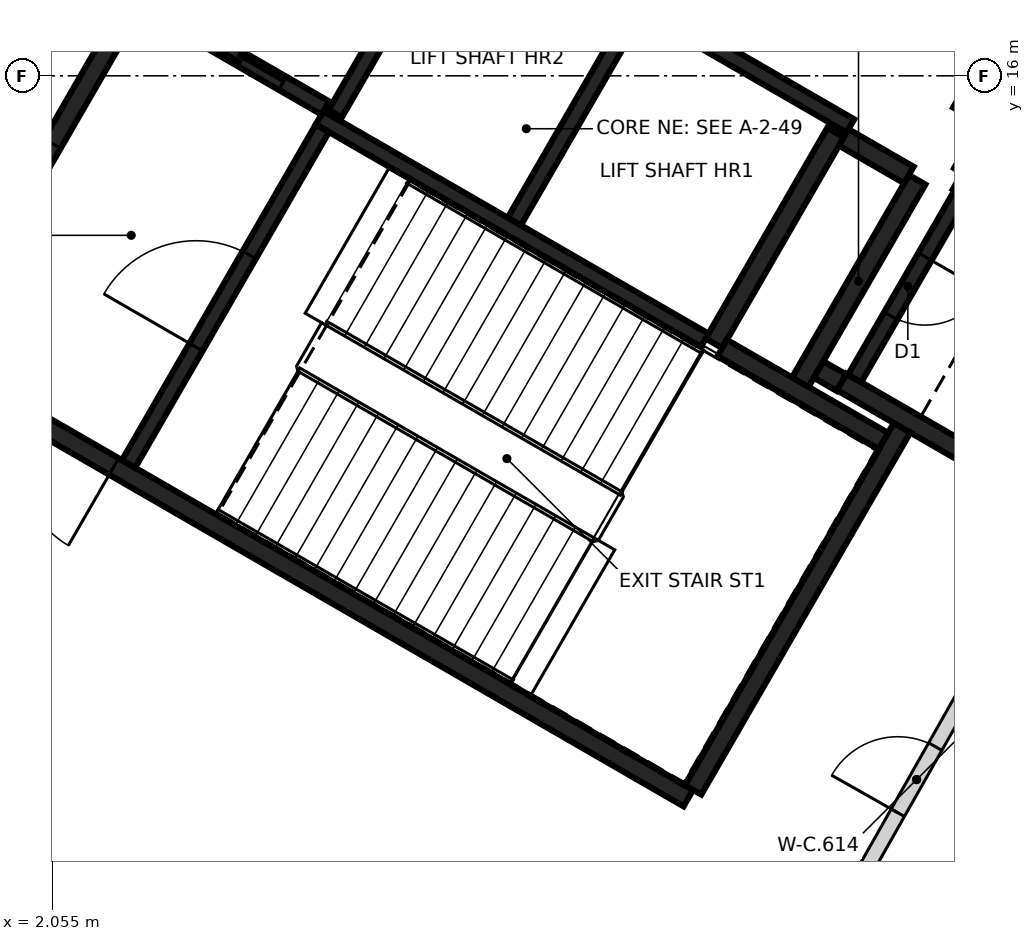
"""IFC4 building model, lengths in metres.
Left out: names, types, materials, properties, quantities, classifications, styles, units other than length and angle.
Written with IfcOpenShell. Run it as: python <this file> out.ifc"""

import sys

from ifc_helpers import new_model, si_unit, direction, frame, frame_2d, origin, place, context, subcontext, project, spatial, rectangle, extrude, element, fill, save


model = new_model("IFC4")
c1 = context("Model", 3, precision=1e-05, world=origin(), true_north=direction((0.0, 1.0)))
c2 = subcontext(c1, "Body", "Model", "MODEL_VIEW")
j1 = project(units=[si_unit("LENGTHUNIT", "METRE"), si_unit("PLANEANGLEUNIT", "RADIAN")], contexts=[c1])
p1 = place(None, origin())
s1 = spatial("IfcSite", under=j1, at=p1, CompositionType="ELEMENT")
p2 = place(p1, origin())
s2 = spatial("IfcBuilding", under=s1, at=p2, CompositionType="ELEMENT")
p3 = place(p2, frame((0.0, 0.0, 164.8)))
s3 = spatial("IfcBuildingStorey", under=s2, at=p3, CompositionType="ELEMENT", Elevation=164.8)
p4 = place(p3, frame((10.42, 6.498, 0.0), z_axis=(0.0, 0.0, 1.0), x_axis=(-0.866021906294, 0.500006057782, 0.0)))
e1 = element("IfcWall", 1, at=p4, inside=s3, PredefinedType="SHEAR", context=c2, shape_type="SweptSolid", body=[
    extrude(rectangle(XDim=11.55, YDim=0.25, at=frame_2d((5.775, 0.0))), origin(), (0.0, 0.0, 1.0), 4.45),
])
p5 = place(p4, frame((10.025, 0.0, 0.0)))
e2 = element("IfcOpeningElement", 2, at=p5, cuts=e1, PredefinedType="OPENING", context=c2, shape_type="SweptSolid", body=[
    extrude(rectangle(XDim=1.2, YDim=2.1, at=frame_2d((0.6, 1.05))), frame((0.0, 0.135, 0.0), z_axis=(0.0, -1.0, 0.0), x_axis=(1.0, 0.0, 0.0)), (0.0, 0.0, 1.0), 0.27),
])
p6 = place(p4, frame((8.725, 0.0, 0.0)))
e3 = element("IfcOpeningElement", 3, at=p6, cuts=e1, PredefinedType="OPENING", context=c2, shape_type="SweptSolid", body=[
    extrude(rectangle(XDim=1.2, YDim=2.1, at=frame_2d((0.6, 1.05))), frame((0.0, 0.135, 0.0), z_axis=(0.0, -1.0, 0.0), x_axis=(1.0, 0.0, 0.0)), (0.0, 0.0, 1.0), 0.27),
])
p7 = place(p3, frame((0.48, 12.381, 0.0), z_axis=(0.0, 0.0, 1.0), x_axis=(0.49999885962, 0.866026062182, 0.0)))
e4 = element("IfcWall", 4, at=p7, inside=s3, PredefinedType="SHEAR", context=c2, shape_type="SweptSolid", body=[
    extrude(rectangle(XDim=5.225, YDim=0.25, at=frame_2d((2.612, 0.0))), origin(), (0.0, 0.0, 1.0), 4.45),
])
p8 = place(p7, frame((1.95, 0.0, 0.0)))
e5 = element("IfcOpeningElement", 5, at=p8, cuts=e4, PredefinedType="OPENING", context=c2, shape_type="SweptSolid", body=[
    extrude(rectangle(XDim=1.2, YDim=2.1, at=frame_2d((0.6, 1.05))), frame((0.0, 0.135, 0.0), z_axis=(0.0, -1.0, 0.0), x_axis=(1.0, 0.0, 0.0)), (0.0, 0.0, 1.0), 0.27),
])
p9 = place(p3, frame((13.238, 11.378, 0.0), z_axis=(0.0, 0.0, 1.0), x_axis=(-0.500008851346, -0.866020293397, 0.0)))
e6 = element("IfcWall", 6, at=p9, inside=s3, PredefinedType="SHEAR", context=c2, shape_type="SweptSolid", body=[
    extrude(rectangle(XDim=5.51, YDim=0.25, at=frame_2d((2.755, 0.0))), origin(), (0.0, 0.0, 1.0), 4.45),
])
p10 = place(p3, frame((12.357, 15.252, 0.0), z_axis=(0.0, 0.0, 1.0), x_axis=(-0.500028443584, -0.866008981251, 0.0)))
e7 = element("IfcWall", 7, at=p10, inside=s3, PredefinedType="SHEAR", context=c2, shape_type="SweptSolid", body=[
    extrude(rectangle(XDim=3.2, YDim=0.25, at=frame_2d((1.6, 0.0))), origin(), (0.0, 0.0, 1.0), 4.45),
])
p11 = place(p3, frame((14.918, 10.54, 0.0), z_axis=(0.0, 0.0, 1.0), x_axis=(-0.866063538972, 0.499933942099, 0.0)))
e8 = element("IfcWall", 8, at=p11, inside=s3, PredefinedType="SHEAR", context=c2, shape_type="SweptSolid", body=[
    extrude(rectangle(XDim=2.865, YDim=0.25, at=frame_2d((1.432, 0.0))), origin(), (0.0, 0.0, 1.0), 4.45),
])
p12 = place(p3, frame((13.963, 14.614, 0.0), z_axis=(0.0, 0.0, 1.0), x_axis=(0.866042235819, -0.499970844928, 0.0)))
e9 = element("IfcWall", 9, at=p12, inside=s3, PredefinedType="SHEAR", context=c2, shape_type="SweptSolid", body=[
    extrude(rectangle(XDim=2.865, YDim=0.25, at=frame_2d((1.432, 0.0))), origin(), (0.0, 0.0, 1.0), 4.45),
])
p13 = place(p3, frame((11.888, 11.961, 0.0), z_axis=(0.0, 0.0, 1.0), x_axis=(0.500003324108, 0.866023484601, 0.0)))
e10 = element("IfcWall", 10, at=p13, inside=s3, PredefinedType="SHEAR", context=c2, shape_type="SweptSolid", body=[
    extrude(rectangle(XDim=3.085, YDim=0.25, at=frame_2d((1.542, 0.0))), origin(), (0.0, 0.0, 1.0), 4.45),
])
p14 = place(p3, frame((10.865, 12.418, 0.0), z_axis=(0.0, 0.0, 1.0), x_axis=(0.866026229868, -0.499998569178, 0.0)))
e11 = element("IfcWall", 11, at=p14, inside=s3, PredefinedType="SHEAR", context=c2, shape_type="SweptSolid", body=[
    extrude(rectangle(XDim=2.449, YDim=0.25, at=frame_2d((1.225, 0.0))), origin(), (0.0, 0.0, 1.0), 4.45),
])
p15 = place(p3, frame((14.945, 17.135, 0.0), z_axis=(0.0, 0.0, 1.0), x_axis=(-0.499983108224, -0.866035156036, 0.0)))
e12 = element("IfcWall", 12, at=p15, inside=s3, PredefinedType="SHEAR", context=c2, shape_type="SweptSolid", body=[
    extrude(rectangle(XDim=1.865, YDim=0.25, at=frame_2d((0.932, 0.0))), origin(), (0.0, 0.0, 1.0), 4.45),
])
p16 = place(p15, frame((0.535, 0.0, 0.0)))
e13 = element("IfcOpeningElement", 13, at=p16, cuts=e12, PredefinedType="OPENING", context=c2, shape_type="SweptSolid", body=[
    extrude(rectangle(XDim=1.25, YDim=2.1, at=frame_2d((0.625, 1.05))), frame((0.0, 0.135, 0.0), z_axis=(0.0, -1.0, 0.0), x_axis=(1.0, 0.0, 0.0)), (0.0, 0.0, 1.0), 0.27),
])
p17 = place(p3, frame((13.322, 14.695, 0.0), z_axis=(0.0, 0.0, 1.0), x_axis=(-0.866017078145, 0.500014420154, 0.0)))
e14 = element("IfcWall", 14, at=p17, inside=s3, PredefinedType="SHEAR", context=c2, shape_type="SweptSolid", body=[
    extrude(rectangle(XDim=0.989, YDim=0.25, at=frame_2d((0.495, 0.0))), origin(), (0.0, 0.0, 1.0), 4.45),
])
p18 = place(p3, frame((14.368, 15.315, 0.0), z_axis=(0.0, 0.0, 1.0), x_axis=(-0.499897359611, -0.866084655132, 0.0)))
e15 = element("IfcWall", 15, at=p18, inside=s3, PredefinedType="SHEAR", context=c2, shape_type="SweptSolid", body=[
    extrude(rectangle(XDim=0.685, YDim=0.25, at=frame_2d((0.342, 0.0))), origin(), (0.0, 0.0, 1.0), 4.45),
])
p19 = place(p3, frame((12.433, 11.964, 0.0), z_axis=(0.0, 0.0, 1.0), x_axis=(-0.866055875208, 0.499947218231, 0.0)))
e16 = element("IfcWall", 16, at=p19, inside=s3, PredefinedType="SHEAR", context=c2, shape_type="SweptSolid", body=[
    extrude(rectangle(XDim=0.345, YDim=0.25, at=frame_2d((0.172, 0.0))), origin(), (0.0, 0.0, 1.0), 4.45),
])
p20 = place(p3, frame((12.552, 15.342, 0.0), z_axis=(0.0, 0.0, 1.0), x_axis=(-0.866030299012, 0.499991521122, 0.0)))
e17 = element("IfcWall", 17, at=p20, inside=s3, PredefinedType="SHEAR", context=c2, shape_type="SweptSolid", body=[
    extrude(rectangle(XDim=6.1, YDim=0.2, at=frame_2d((3.05, 0.0))), origin(), (0.0, 0.0, 1.0), 4.45),
])
p21 = place(p3, frame((10.636, 12.521, 0.0), z_axis=(0.0, 0.0, 1.0), x_axis=(-0.866013252188, 0.500021046592, 0.0)))
e18 = element("IfcWall", 18, at=p21, inside=s3, PredefinedType="SHEAR", context=c2, shape_type="SweptSolid", body=[
    extrude(rectangle(XDim=5.851, YDim=0.2, at=frame_2d((2.925, 0.0))), origin(), (0.0, 0.0, 1.0), 4.45),
])
p22 = place(p3, frame((3.057, 10.895, 0.0), z_axis=(0.0, 0.0, 1.0), x_axis=(0.500027839223, 0.866009330205, 0.0)))
e19 = element("IfcWall", 19, at=p22, inside=s3, PredefinedType="SHEAR", context=c2, shape_type="SweptSolid", body=[
    extrude(rectangle(XDim=5.098, YDim=0.2, at=frame_2d((2.549, 0.0))), origin(), (0.0, 0.0, 1.0), 4.45),
])
p23 = place(p22, frame((1.774, 0.0, 0.0)))
e20 = element("IfcOpeningElement", 20, at=p23, cuts=e19, PredefinedType="OPENING", context=c2, shape_type="SweptSolid", body=[
    extrude(rectangle(XDim=1.4, YDim=2.1, at=frame_2d((0.7, 1.05))), frame((0.0, 0.11, 0.0), z_axis=(0.0, -1.0, 0.0), x_axis=(1.0, 0.0, 0.0)), (0.0, 0.0, 1.0), 0.22),
])
p24 = place(p3, frame((8.132, 14.084, 0.0), z_axis=(0.0, 0.0, 1.0), x_axis=(0.500030834389, 0.86600760081, 0.0)))
e21 = element("IfcWall", 21, at=p24, inside=s3, PredefinedType="SHEAR", context=c2, shape_type="SweptSolid", body=[
    extrude(rectangle(XDim=3.198, YDim=0.2, at=frame_2d((1.599, 0.0))), origin(), (0.0, 0.0, 1.0), 4.45),
])
p25 = place(p3, frame((14.008, 14.442, 0.0), z_axis=(0.0, 0.0, 1.0), x_axis=(-0.499986818241, -0.866033014143, 0.0)))
e22 = element("IfcWall", 22, at=p25, inside=s3, PredefinedType="SHEAR", context=c2, shape_type="SweptSolid", body=[
    extrude(rectangle(XDim=2.798, YDim=0.2, at=frame_2d((1.399, 0.0))), origin(), (0.0, 0.0, 1.0), 4.45),
])
p26 = place(p25, frame((0.949, 0.0, 0.0)))
e23 = element("IfcOpeningElement", 23, at=p26, cuts=e22, PredefinedType="OPENING", context=c2, shape_type="SweptSolid", body=[
    extrude(rectangle(XDim=0.9, YDim=2.1, at=frame_2d((0.45, 1.05))), frame((0.0, 0.11, 0.0), z_axis=(0.0, -1.0, 0.0), x_axis=(1.0, 0.0, 0.0)), (0.0, 0.0, 1.0), 0.22),
])
p27 = place(p3, frame((7.324, 18.187, 0.0), z_axis=(0.0, 0.0, 1.0), x_axis=(-0.499967891604, -0.866043940782, 0.0)))
e24 = element("IfcWall", 24, at=p27, inside=s3, PredefinedType="SHEAR", context=c2, shape_type="SweptSolid", body=[
    extrude(rectangle(XDim=3.1, YDim=0.2, at=frame_2d((1.55, 0.0))), origin(), (0.0, 0.0, 1.0), 4.45),
])
p28 = place(p3, frame((5.646, 15.576, 0.0), z_axis=(0.0, 0.0, 1.0), x_axis=(-0.866018407898, 0.500012117035, 0.0)))
e25 = element("IfcWall", 25, at=p28, inside=s3, PredefinedType="SHEAR", context=c2, shape_type="SweptSolid", body=[
    extrude(rectangle(XDim=2.651, YDim=0.2, at=frame_2d((1.325, 0.0))), origin(), (0.0, 0.0, 1.0), 4.45),
])
p29 = place(p28, frame((0.652, 0.0, 0.0)))
e26 = element("IfcOpeningElement", 26, at=p29, cuts=e25, PredefinedType="OPENING", context=c2, shape_type="SweptSolid", body=[
    extrude(rectangle(XDim=1.3, YDim=2.1, at=frame_2d((0.65, 1.05))), frame((0.0, 0.11, 0.0), z_axis=(0.0, -1.0, 0.0), x_axis=(1.0, 0.0, 0.0)), (0.0, 0.0, 1.0), 0.22),
])
p30 = place(p3, frame((12.403, 4.939, 0.0), z_axis=(0.0, 0.0, 1.0), x_axis=(0.492759848643, 0.870165347256, 0.0)))
e27 = element("IfcWall", 27, at=p30, inside=s3, PredefinedType="PARTITIONING", context=c2, shape_type="SweptSolid", body=[
    extrude(rectangle(XDim=4.144, YDim=0.2, at=frame_2d((2.072, 0.0))), origin(), (0.0, 0.0, 1.0), 4.45),
])
p31 = place(p30, frame((1.57, 0.0, 0.0)))
e28 = element("IfcOpeningElement", 28, at=p31, cuts=e27, PredefinedType="OPENING", context=c2, shape_type="SweptSolid", body=[
    extrude(rectangle(XDim=1.0, YDim=2.1, at=frame_2d((0.5, 1.05))), frame((0.0, 0.11, 0.0), z_axis=(0.0, -1.0, 0.0), x_axis=(1.0, 0.0, 0.0)), (0.0, 0.0, 1.0), 0.22),
])
p32 = place(p29, origin())
e29 = element("IfcDoor", 29, at=p32, inside=s3, OperationType="SLIDING_TO_RIGHT", PredefinedType="DOOR", context=c2, shape_type="SweptSolid", body=[
    extrude(rectangle(XDim=1.3, YDim=2.1, at=frame_2d((0.65, 1.05))), frame((0.0, 0.025, 0.0), z_axis=(0.0, -1.0, 0.0), x_axis=(1.0, 0.0, 0.0)), (0.0, 0.0, 1.0), 0.05),
])
fill(e26, e29)
p33 = place(p6, origin())
e30 = element("IfcDoor", 30, at=p33, inside=s3, OperationType="SINGLE_SWING_RIGHT", PredefinedType="DOOR", context=c2, shape_type="SweptSolid", body=[
    extrude(rectangle(XDim=1.2, YDim=2.1, at=frame_2d((0.6, 1.05))), frame((0.0, 0.025, 0.0), z_axis=(0.0, -1.0, 0.0), x_axis=(1.0, 0.0, 0.0)), (0.0, 0.0, 1.0), 0.05),
])
fill(e3, e30)
p34 = place(p23, origin())
e31 = element("IfcDoor", 31, at=p34, inside=s3, OperationType="SINGLE_SWING_RIGHT", PredefinedType="DOOR", context=c2, shape_type="SweptSolid", body=[
    extrude(rectangle(XDim=1.4, YDim=2.1, at=frame_2d((0.7, 1.05))), frame((0.0, 0.025, 0.0), z_axis=(0.0, -1.0, 0.0), x_axis=(1.0, 0.0, 0.0)), (0.0, 0.0, 1.0), 0.05),
])
fill(e20, e31)
p35 = place(p26, origin())
e32 = element("IfcDoor", 32, at=p35, inside=s3, OperationType="SINGLE_SWING_LEFT", PredefinedType="DOOR", context=c2, shape_type="SweptSolid", body=[
    extrude(rectangle(XDim=0.9, YDim=2.1, at=frame_2d((0.45, 1.05))), frame((0.0, 0.025, 0.0), z_axis=(0.0, -1.0, 0.0), x_axis=(1.0, 0.0, 0.0)), (0.0, 0.0, 1.0), 0.05),
])
fill(e23, e32)
p36 = place(p8, origin())
e33 = element("IfcDoor", 33, at=p36, inside=s3, OperationType="SINGLE_SWING_LEFT", PredefinedType="DOOR", context=c2, shape_type="SweptSolid", body=[
    extrude(rectangle(XDim=1.2, YDim=2.1, at=frame_2d((0.6, 1.05))), frame((0.0, 0.025, 0.0), z_axis=(0.0, -1.0, 0.0), x_axis=(1.0, 0.0, 0.0)), (0.0, 0.0, 1.0), 0.05),
])
fill(e5, e33)
p37 = place(p31, frame((1.0, 0.0, 0.0), z_axis=(0.0, 0.0, 1.0), x_axis=(-1.0, 0.0, 0.0)))
e34 = element("IfcDoor", 34, at=p37, inside=s3, OperationType="SINGLE_SWING_LEFT", PredefinedType="DOOR", context=c2, shape_type="SweptSolid", body=[
    extrude(rectangle(XDim=1.0, YDim=2.1, at=frame_2d((0.5, 1.05))), frame((0.0, 0.025, 0.0), z_axis=(0.0, -1.0, 0.0), x_axis=(1.0, 0.0, 0.0)), (0.0, 0.0, 1.0), 0.05),
])
fill(e28, e34)
save(model, sys.argv[1])
